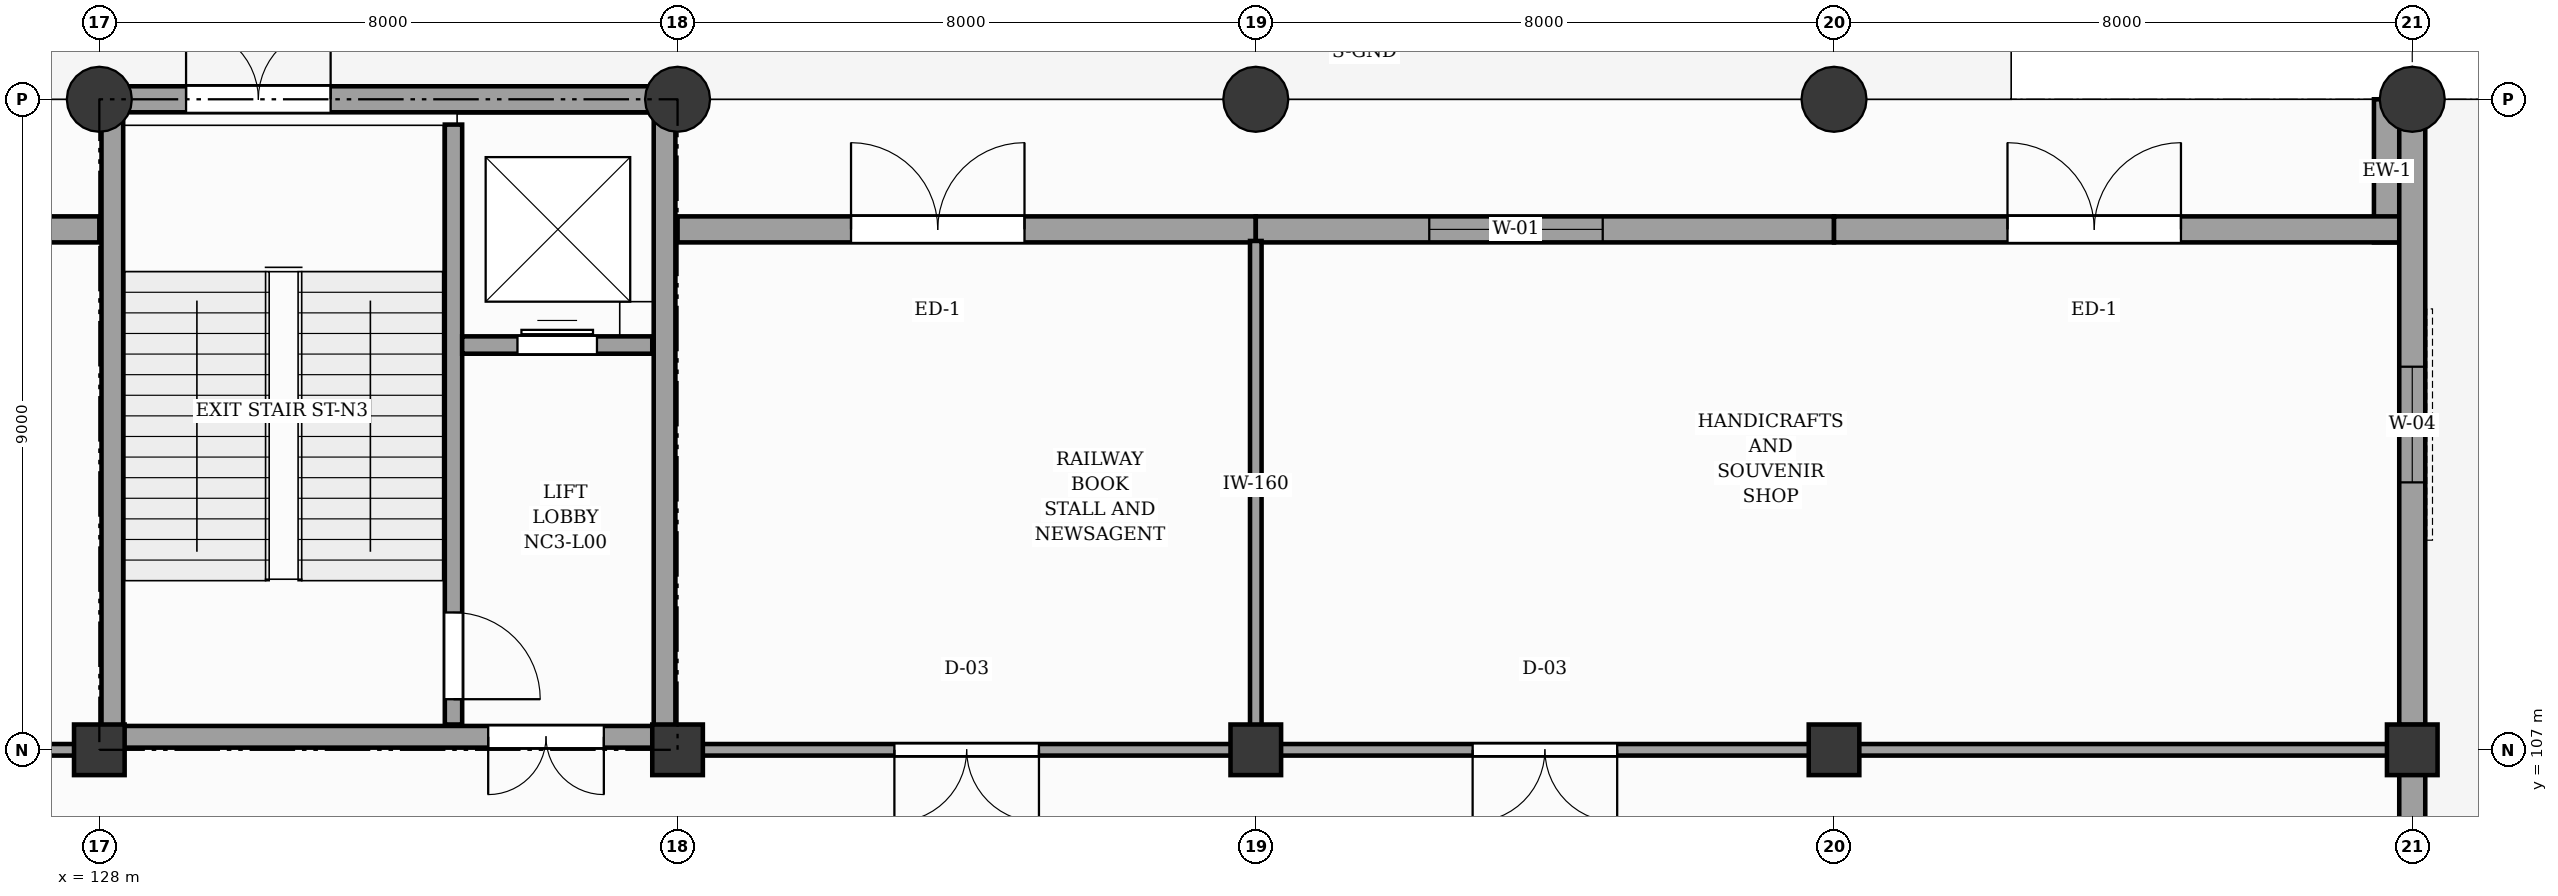
"""IFC4 building model, lengths in metres.
Left out: names, types, materials, properties, quantities, classifications, styles, units other than length and angle.
Written with IfcOpenShell. Run it as: python <this file> out.ifc"""

import sys

from ifc_helpers import new_model, si_unit, direction, frame, frame_2d, origin, origin_2d, place, context, subcontext, project, spatial, rectangle, circle, extrude, element, fill, save


model = new_model("IFC4")
c1 = context("Model", 3, precision=1e-05, world=origin(), true_north=direction((0.0, 1.0)))
c2 = subcontext(c1, "Body", "Model", "MODEL_VIEW")
j1 = project(units=[si_unit("LENGTHUNIT", "METRE"), si_unit("PLANEANGLEUNIT", "RADIAN")], contexts=[c1])
p1 = place(None, origin())
s1 = spatial("IfcSite", under=j1, at=p1, CompositionType="ELEMENT")
p2 = place(p1, origin())
s2 = spatial("IfcBuilding", under=s1, at=p2, CompositionType="ELEMENT")
p3 = place(p2, origin())
s3 = spatial("IfcBuildingStorey", under=s2, at=p3, CompositionType="ELEMENT", Elevation=0.0)
p4 = place(p3, frame((128.0, 107.0, -0.3), z_axis=(0.0, 0.0, 1.0), x_axis=(1.0, 0.0, 0.0)))
e1 = element("IfcColumn", 1, at=p4, inside=s3, PredefinedType="COLUMN", context=c2, shape_type="SweptSolid", body=[
    extrude(rectangle(XDim=0.7, YDim=0.7, at=origin_2d()), origin(), (0.0, 0.0, 1.0), 5.1),
])
p5 = place(p3, frame((128.0, 116.0, -0.3), z_axis=(0.0, 0.0, 1.0), x_axis=(1.0, 0.0, 0.0)))
e2 = element("IfcColumn", 2, at=p5, inside=s3, PredefinedType="PILASTER", context=c2, shape_type="SweptSolid", body=[
    extrude(circle(Radius=0.45, at=origin_2d()), origin(), (0.0, 0.0, 1.0), 5.1),
])
p6 = place(p3, frame((136.0, 107.0, -0.3), z_axis=(0.0, 0.0, 1.0), x_axis=(1.0, 0.0, 0.0)))
e3 = element("IfcColumn", 3, at=p6, inside=s3, PredefinedType="COLUMN", context=c2, shape_type="SweptSolid", body=[
    extrude(rectangle(XDim=0.7, YDim=0.7, at=origin_2d()), origin(), (0.0, 0.0, 1.0), 5.1),
])
p7 = place(p3, frame((136.0, 116.0, -0.3), z_axis=(0.0, 0.0, 1.0), x_axis=(1.0, 0.0, 0.0)))
e4 = element("IfcColumn", 4, at=p7, inside=s3, PredefinedType="PILASTER", context=c2, shape_type="SweptSolid", body=[
    extrude(circle(Radius=0.45, at=origin_2d()), origin(), (0.0, 0.0, 1.0), 5.1),
])
p8 = place(p3, frame((144.0, 107.0, -0.3), z_axis=(0.0, 0.0, 1.0), x_axis=(1.0, 0.0, 0.0)))
e5 = element("IfcColumn", 5, at=p8, inside=s3, PredefinedType="COLUMN", context=c2, shape_type="SweptSolid", body=[
    extrude(rectangle(XDim=0.7, YDim=0.7, at=origin_2d()), origin(), (0.0, 0.0, 1.0), 5.1),
])
p9 = place(p3, frame((144.0, 116.0, -0.3), z_axis=(0.0, 0.0, 1.0), x_axis=(1.0, 0.0, 0.0)))
e6 = element("IfcColumn", 6, at=p9, inside=s3, PredefinedType="PILASTER", context=c2, shape_type="SweptSolid", body=[
    extrude(circle(Radius=0.45, at=origin_2d()), origin(), (0.0, 0.0, 1.0), 5.1),
])
p10 = place(p3, frame((152.0, 107.0, -0.3), z_axis=(0.0, 0.0, 1.0), x_axis=(1.0, 0.0, 0.0)))
e7 = element("IfcColumn", 7, at=p10, inside=s3, PredefinedType="COLUMN", context=c2, shape_type="SweptSolid", body=[
    extrude(rectangle(XDim=0.7, YDim=0.7, at=origin_2d()), origin(), (0.0, 0.0, 1.0), 5.1),
])
p11 = place(p3, frame((152.0, 116.0, -0.3), z_axis=(0.0, 0.0, 1.0), x_axis=(1.0, 0.0, 0.0)))
e8 = element("IfcColumn", 8, at=p11, inside=s3, PredefinedType="PILASTER", context=c2, shape_type="SweptSolid", body=[
    extrude(circle(Radius=0.45, at=origin_2d()), origin(), (0.0, 0.0, 1.0), 5.1),
])
p12 = place(p3, frame((160.0, 107.0, -0.3), z_axis=(0.0, 0.0, 1.0), x_axis=(1.0, 0.0, 0.0)))
e9 = element("IfcColumn", 9, at=p12, inside=s3, PredefinedType="COLUMN", context=c2, shape_type="SweptSolid", body=[
    extrude(rectangle(XDim=0.7, YDim=0.7, at=origin_2d()), origin(), (0.0, 0.0, 1.0), 5.1),
])
p13 = place(p3, frame((160.0, 116.0, -0.3), z_axis=(0.0, 0.0, 1.0), x_axis=(1.0, 0.0, 0.0)))
e10 = element("IfcColumn", 10, at=p13, inside=s3, PredefinedType="PILASTER", context=c2, shape_type="SweptSolid", body=[
    extrude(circle(Radius=0.45, at=origin_2d()), origin(), (0.0, 0.0, 1.0), 5.1),
])
p14 = place(p3, frame((120.0, 114.2, 0.0), z_axis=(0.0, 0.0, 1.0), x_axis=(1.0, 0.0, 0.0)))
e11 = element("IfcWall", 11, at=p14, inside=s3, PredefinedType="SOLIDWALL", context=c2, shape_type="SweptSolid", body=[
    extrude(rectangle(XDim=8.0, YDim=0.36, at=frame_2d((4.0, 0.0))), origin(), (0.0, 0.0, 1.0), 3.84),
])
p15 = place(p14, frame((2.4, 0.0, 0.0)))
e12 = element("IfcOpeningElement", 12, at=p15, cuts=e11, PredefinedType="OPENING", context=c2, shape_type="SweptSolid", body=[
    extrude(rectangle(XDim=2.4, YDim=2.35, at=frame_2d((1.2, 1.175))), frame((0.0, 0.19, 0.0), z_axis=(0.0, -1.0, 0.0), x_axis=(1.0, 0.0, 0.0)), (0.0, 0.0, 1.0), 0.38),
])
p16 = place(p3, frame((128.4, 116.0, 0.0), z_axis=(0.0, 0.0, 1.0), x_axis=(1.0, 0.0, 0.0)))
e13 = element("IfcWall", 13, at=p16, inside=s3, PredefinedType="SOLIDWALL", context=c2, shape_type="SweptSolid", body=[
    extrude(rectangle(XDim=7.2, YDim=0.36, at=frame_2d((3.6, 0.0))), origin(), (0.0, 0.0, 1.0), 3.84),
])
p17 = place(p16, frame((0.8, 0.0, 0.0)))
e14 = element("IfcOpeningElement", 14, at=p17, cuts=e13, PredefinedType="OPENING", context=c2, shape_type="SweptSolid", body=[
    extrude(rectangle(XDim=2.0, YDim=2.2, at=frame_2d((1.0, 1.1))), frame((0.0, 0.19, 0.0), z_axis=(0.0, -1.0, 0.0), x_axis=(1.0, 0.0, 0.0)), (0.0, 0.0, 1.0), 0.38),
])
p18 = place(p3, frame((136.0, 114.2, 0.0), z_axis=(0.0, 0.0, 1.0), x_axis=(1.0, 0.0, 0.0)))
e15 = element("IfcWall", 15, at=p18, inside=s3, PredefinedType="SOLIDWALL", context=c2, shape_type="SweptSolid", body=[
    extrude(rectangle(XDim=8.0, YDim=0.36, at=frame_2d((4.0, 0.0))), origin(), (0.0, 0.0, 1.0), 3.84),
])
p19 = place(p18, frame((2.4, 0.0, 0.0)))
e16 = element("IfcOpeningElement", 16, at=p19, cuts=e15, PredefinedType="OPENING", context=c2, shape_type="SweptSolid", body=[
    extrude(rectangle(XDim=2.4, YDim=2.35, at=frame_2d((1.2, 1.175))), frame((0.0, 0.19, 0.0), z_axis=(0.0, -1.0, 0.0), x_axis=(1.0, 0.0, 0.0)), (0.0, 0.0, 1.0), 0.38),
])
p20 = place(p3, frame((144.0, 114.2, 0.0), z_axis=(0.0, 0.0, 1.0), x_axis=(1.0, 0.0, 0.0)))
e17 = element("IfcWall", 17, at=p20, inside=s3, PredefinedType="SOLIDWALL", context=c2, shape_type="SweptSolid", body=[
    extrude(rectangle(XDim=8.0, YDim=0.36, at=frame_2d((4.0, 0.0))), origin(), (0.0, 0.0, 1.0), 3.84),
])
p21 = place(p20, frame((2.4, 0.0, 0.9)))
e18 = element("IfcOpeningElement", 18, at=p21, cuts=e17, PredefinedType="OPENING", context=c2, shape_type="SweptSolid", body=[
    extrude(rectangle(XDim=2.4, YDim=2.6, at=frame_2d((1.2, 1.3))), frame((0.0, 0.19, 0.0), z_axis=(0.0, -1.0, 0.0), x_axis=(1.0, 0.0, 0.0)), (0.0, 0.0, 1.0), 0.38),
])
p22 = place(p3, frame((159.65, 114.02, 0.0), z_axis=(0.0, 0.0, 1.0), x_axis=(0.0, 1.0, 0.0)))
e19 = element("IfcWall", 19, at=p22, inside=s3, PredefinedType="SOLIDWALL", context=c2, shape_type="SweptSolid", body=[
    extrude(rectangle(XDim=1.98, YDim=0.36, at=frame_2d((0.99, 0.0))), origin(), (0.0, 0.0, 1.0), 3.84),
])
p23 = place(p3, frame((152.0, 114.2, 0.0), z_axis=(0.0, 0.0, 1.0), x_axis=(1.0, 0.0, 0.0)))
e20 = element("IfcWall", 20, at=p23, inside=s3, PredefinedType="SOLIDWALL", context=c2, shape_type="SweptSolid", body=[
    extrude(rectangle(XDim=8.0, YDim=0.36, at=frame_2d((4.0, 0.0))), origin(), (0.0, 0.0, 1.0), 3.84),
])
p24 = place(p23, frame((2.4, 0.0, 0.0)))
e21 = element("IfcOpeningElement", 21, at=p24, cuts=e20, PredefinedType="OPENING", context=c2, shape_type="SweptSolid", body=[
    extrude(rectangle(XDim=2.4, YDim=2.35, at=frame_2d((1.2, 1.175))), frame((0.0, 0.19, 0.0), z_axis=(0.0, -1.0, 0.0), x_axis=(1.0, 0.0, 0.0)), (0.0, 0.0, 1.0), 0.38),
])
p25 = place(p3, frame((160.0, 98.345, 0.0), z_axis=(0.0, 0.0, 1.0), x_axis=(0.0, 1.0, 0.0)))
e22 = element("IfcWall", 22, at=p25, inside=s3, PredefinedType="SOLIDWALL", context=c2, shape_type="SweptSolid", body=[
    extrude(rectangle(XDim=8.31, YDim=0.36, at=frame_2d((4.155, 0.0))), origin(), (0.0, 0.0, 1.0), 3.71),
])
p26 = place(p25, frame((2.955, 0.0, 0.0)))
e23 = element("IfcOpeningElement", 23, at=p26, cuts=e22, PredefinedType="OPENING", context=c2, shape_type="SweptSolid", body=[
    extrude(rectangle(XDim=2.4, YDim=2.35, at=frame_2d((1.2, 1.175))), frame((0.0, 0.19, 0.0), z_axis=(0.0, -1.0, 0.0), x_axis=(1.0, 0.0, 0.0)), (0.0, 0.0, 1.0), 0.38),
])
p27 = place(p3, frame((160.0, 107.345, 0.0), z_axis=(0.0, 0.0, 1.0), x_axis=(0.0, 1.0, 0.0)))
e24 = element("IfcWall", 24, at=p27, inside=s3, PredefinedType="SOLIDWALL", context=c2, shape_type="SweptSolid", body=[
    extrude(rectangle(XDim=8.255, YDim=0.36, at=frame_2d((4.127, 0.0))), origin(), (0.0, 0.0, 1.0), 3.76),
])
p28 = place(p27, frame((3.355, 0.0, 0.95)))
e25 = element("IfcOpeningElement", 25, at=p28, cuts=e24, PredefinedType="OPENING", context=c2, shape_type="SweptSolid", body=[
    extrude(rectangle(XDim=1.6, YDim=2.1, at=frame_2d((0.8, 1.05))), frame((0.0, 0.19, 0.0), z_axis=(0.0, -1.0, 0.0), x_axis=(1.0, 0.0, 0.0)), (0.0, 0.0, 1.0), 0.38),
])
p29 = place(p3, frame((132.9, 107.35, 0.0), z_axis=(0.0, 0.0, 1.0), x_axis=(0.0, 1.0, 0.0)))
e26 = element("IfcWall", 26, at=p29, inside=s3, PredefinedType="SHEAR", context=c2, shape_type="SweptSolid", body=[
    extrude(rectangle(XDim=8.3, YDim=0.24, at=frame_2d((4.15, 0.0))), origin(), (0.0, 0.0, 1.0), 4.52),
])
p30 = place(p29, frame((0.35, 0.0, 0.0)))
e27 = element("IfcOpeningElement", 27, at=p30, cuts=e26, PredefinedType="OPENING", context=c2, shape_type="SweptSolid", body=[
    extrude(rectangle(XDim=1.2, YDim=2.15, at=frame_2d((0.6, 1.075))), frame((0.0, 0.13, 0.0), z_axis=(0.0, -1.0, 0.0), x_axis=(1.0, 0.0, 0.0)), (0.0, 0.0, 1.0), 0.26),
])
p31 = place(p3, frame((133.02, 112.6, 0.0), z_axis=(0.0, 0.0, 1.0), x_axis=(1.0, 0.0, 0.0)))
e28 = element("IfcWall", 28, at=p31, inside=s3, PredefinedType="SHEAR", context=c2, shape_type="SweptSolid", body=[
    extrude(rectangle(XDim=2.63, YDim=0.24, at=frame_2d((1.315, 0.0))), origin(), (0.0, 0.0, 1.0), 4.52),
])
p32 = place(p31, frame((0.765, 0.0, 0.0)))
e29 = element("IfcOpeningElement", 29, at=p32, cuts=e28, PredefinedType="OPENING", context=c2, shape_type="SweptSolid", body=[
    extrude(rectangle(XDim=1.1, YDim=2.15, at=frame_2d((0.55, 1.075))), frame((0.0, 0.13, 0.0), z_axis=(0.0, -1.0, 0.0), x_axis=(1.0, 0.0, 0.0)), (0.0, 0.0, 1.0), 0.26),
])
for number, where, z_axis, x_axis in (
    (30, (128.18, 107.18, 0.0), (0.0, 0.0, 1.0), (0.0, 1.0, 0.0)),
    (31, (135.82, 107.18, 0.0), (0.0, 0.0, 1.0), (0.0, 1.0, 0.0)),
):
    element("IfcWall", number, at=place(p3, frame(where, z_axis=z_axis, x_axis=x_axis)), inside=s3, PredefinedType="SHEAR", context=c2, shape_type="SweptSolid", body=[
        extrude(rectangle(XDim=8.64, YDim=0.3, at=frame_2d((4.32, 0.0))), origin(), (0.0, 0.0, 1.0), 4.52),
    ])
p33 = place(p3, frame((128.03, 107.18, 0.0), z_axis=(0.0, 0.0, 1.0), x_axis=(1.0, 0.0, 0.0)))
e32 = element("IfcWall", 32, at=p33, inside=s3, PredefinedType="SHEAR", context=c2, shape_type="SweptSolid", body=[
    extrude(rectangle(XDim=7.94, YDim=0.3, at=frame_2d((3.97, 0.0))), origin(), (0.0, 0.0, 1.0), 4.52),
])
p34 = place(p33, frame((5.35, 0.0, 0.0)))
e33 = element("IfcOpeningElement", 33, at=p34, cuts=e32, PredefinedType="OPENING", context=c2, shape_type="SweptSolid", body=[
    extrude(rectangle(XDim=1.6, YDim=2.15, at=frame_2d((0.8, 1.075))), frame((0.0, 0.16, 0.0), z_axis=(0.0, -1.0, 0.0), x_axis=(1.0, 0.0, 0.0)), (0.0, 0.0, 1.0), 0.32),
])
p35 = place(p3, frame((120.3, 107.0, 0.0), z_axis=(0.0, 0.0, 1.0), x_axis=(1.0, 0.0, 0.0)))
e34 = element("IfcWall", 34, at=p35, inside=s3, PredefinedType="PARTITIONING", context=c2, shape_type="SweptSolid", body=[
    extrude(rectangle(XDim=7.4, YDim=0.16, at=frame_2d((3.7, 0.0))), origin(), (0.0, 0.0, 1.0), 2.93),
])
p36 = place(p35, frame((2.7, 0.0, 0.0)))
e35 = element("IfcOpeningElement", 35, at=p36, cuts=e34, PredefinedType="OPENING", context=c2, shape_type="SweptSolid", body=[
    extrude(rectangle(XDim=2.0, YDim=2.3, at=frame_2d((1.0, 1.15))), frame((0.0, 0.09, 0.0), z_axis=(0.0, -1.0, 0.0), x_axis=(1.0, 0.0, 0.0)), (0.0, 0.0, 1.0), 0.18),
])
p37 = place(p3, frame((136.3, 107.0, 0.0), z_axis=(0.0, 0.0, 1.0), x_axis=(1.0, 0.0, 0.0)))
e36 = element("IfcWall", 36, at=p37, inside=s3, PredefinedType="PARTITIONING", context=c2, shape_type="SweptSolid", body=[
    extrude(rectangle(XDim=7.4, YDim=0.16, at=frame_2d((3.7, 0.0))), origin(), (0.0, 0.0, 1.0), 3.7),
])
p38 = place(p37, frame((2.7, 0.0, 0.0)))
e37 = element("IfcOpeningElement", 37, at=p38, cuts=e36, PredefinedType="OPENING", context=c2, shape_type="SweptSolid", body=[
    extrude(rectangle(XDim=2.0, YDim=2.3, at=frame_2d((1.0, 1.15))), frame((0.0, 0.09, 0.0), z_axis=(0.0, -1.0, 0.0), x_axis=(1.0, 0.0, 0.0)), (0.0, 0.0, 1.0), 0.18),
])
p39 = place(p3, frame((144.0, 107.3, 0.0), z_axis=(0.0, 0.0, 1.0), x_axis=(0.0, 1.0, 0.0)))
e38 = element("IfcWall", 38, at=p39, inside=s3, PredefinedType="PARTITIONING", context=c2, shape_type="SweptSolid", body=[
    extrude(rectangle(XDim=6.74, YDim=0.16, at=frame_2d((3.37, 0.0))), origin(), (0.0, 0.0, 1.0), 3.7),
])
p40 = place(p3, frame((144.3, 107.0, 0.0), z_axis=(0.0, 0.0, 1.0), x_axis=(1.0, 0.0, 0.0)))
e39 = element("IfcWall", 39, at=p40, inside=s3, PredefinedType="PARTITIONING", context=c2, shape_type="SweptSolid", body=[
    extrude(rectangle(XDim=7.4, YDim=0.16, at=frame_2d((3.7, 0.0))), origin(), (0.0, 0.0, 1.0), 3.7),
])
p41 = place(p40, frame((2.7, 0.0, 0.0)))
e40 = element("IfcOpeningElement", 40, at=p41, cuts=e39, PredefinedType="OPENING", context=c2, shape_type="SweptSolid", body=[
    extrude(rectangle(XDim=2.0, YDim=2.3, at=frame_2d((1.0, 1.15))), frame((0.0, 0.09, 0.0), z_axis=(0.0, -1.0, 0.0), x_axis=(1.0, 0.0, 0.0)), (0.0, 0.0, 1.0), 0.18),
])
p42 = place(p3, frame((152.3, 107.0, 0.0), z_axis=(0.0, 0.0, 1.0), x_axis=(1.0, 0.0, 0.0)))
e41 = element("IfcWall", 41, at=p42, inside=s3, PredefinedType="PARTITIONING", context=c2, shape_type="SweptSolid", body=[
    extrude(rectangle(XDim=7.4, YDim=0.16, at=frame_2d((3.7, 0.0))), origin(), (0.0, 0.0, 1.0), 3.7),
])
p43 = place(p17, origin())
e42 = element("IfcDoor", 42, at=p43, inside=s3, OperationType="DOUBLE_DOOR_SINGLE_SWING", PredefinedType="DOOR", context=c2, shape_type="SweptSolid", body=[
    extrude(rectangle(XDim=2.0, YDim=2.2, at=frame_2d((1.0, 1.1))), frame((0.0, 0.025, 0.0), z_axis=(0.0, -1.0, 0.0), x_axis=(1.0, 0.0, 0.0)), (0.0, 0.0, 1.0), 0.05),
])
fill(e14, e42)
p44 = place(p19, origin())
e43 = element("IfcDoor", 43, at=p44, inside=s3, OperationType="DOUBLE_DOOR_SINGLE_SWING", PredefinedType="DOOR", context=c2, shape_type="SweptSolid", body=[
    extrude(rectangle(XDim=2.4, YDim=2.35, at=frame_2d((1.2, 1.175))), frame((0.0, 0.025, 0.0), z_axis=(0.0, -1.0, 0.0), x_axis=(1.0, 0.0, 0.0)), (0.0, 0.0, 1.0), 0.05),
])
fill(e16, e43)
p45 = place(p21, origin())
e44 = element("IfcWindow", 44, at=p45, inside=s3, PartitioningType="SINGLE_PANEL", PredefinedType="WINDOW", context=c2, shape_type="SweptSolid", body=[
    extrude(rectangle(XDim=2.4, YDim=2.6, at=frame_2d((1.2, 1.3))), frame((0.0, 0.03, 0.0), z_axis=(0.0, -1.0, 0.0), x_axis=(1.0, 0.0, 0.0)), (0.0, 0.0, 1.0), 0.06),
])
fill(e18, e44)
p46 = place(p24, origin())
e45 = element("IfcDoor", 45, at=p46, inside=s3, OperationType="DOUBLE_DOOR_SINGLE_SWING", PredefinedType="DOOR", context=c2, shape_type="SweptSolid", body=[
    extrude(rectangle(XDim=2.4, YDim=2.35, at=frame_2d((1.2, 1.175))), frame((0.0, 0.025, 0.0), z_axis=(0.0, -1.0, 0.0), x_axis=(1.0, 0.0, 0.0)), (0.0, 0.0, 1.0), 0.05),
])
fill(e21, e45)
p47 = place(p28, origin())
e46 = element("IfcWindow", 46, at=p47, inside=s3, PartitioningType="SINGLE_PANEL", PredefinedType="WINDOW", context=c2, shape_type="SweptSolid", body=[
    extrude(rectangle(XDim=1.6, YDim=2.1, at=frame_2d((0.8, 1.05))), frame((0.0, 0.03, 0.0), z_axis=(0.0, -1.0, 0.0), x_axis=(1.0, 0.0, 0.0)), (0.0, 0.0, 1.0), 0.06),
])
fill(e25, e46)
p48 = place(p30, frame((1.2, 0.0, 0.0), z_axis=(0.0, 0.0, 1.0), x_axis=(-1.0, 0.0, 0.0)))
e47 = element("IfcDoor", 47, at=p48, inside=s3, OperationType="SINGLE_SWING_LEFT", PredefinedType="DOOR", context=c2, shape_type="SweptSolid", body=[
    extrude(rectangle(XDim=1.2, YDim=2.15, at=frame_2d((0.6, 1.075))), frame((0.0, 0.025, 0.0), z_axis=(0.0, -1.0, 0.0), x_axis=(1.0, 0.0, 0.0)), (0.0, 0.0, 1.0), 0.05),
])
fill(e27, e47)
p49 = place(p32, origin())
e48 = element("IfcDoor", 48, at=p49, inside=s3, OperationType="DOUBLE_DOOR_SLIDING", PredefinedType="DOOR", context=c2, shape_type="SweptSolid", body=[
    extrude(rectangle(XDim=1.1, YDim=2.15, at=frame_2d((0.55, 1.075))), frame((0.0, 0.025, 0.0), z_axis=(0.0, -1.0, 0.0), x_axis=(1.0, 0.0, 0.0)), (0.0, 0.0, 1.0), 0.05),
])
fill(e29, e48)
p50 = place(p34, frame((1.6, 0.0, 0.0), z_axis=(0.0, 0.0, 1.0), x_axis=(-1.0, 0.0, 0.0)))
e49 = element("IfcDoor", 49, at=p50, inside=s3, OperationType="DOUBLE_DOOR_SINGLE_SWING", PredefinedType="DOOR", context=c2, shape_type="SweptSolid", body=[
    extrude(rectangle(XDim=1.6, YDim=2.15, at=frame_2d((0.8, 1.075))), frame((0.0, 0.025, 0.0), z_axis=(0.0, -1.0, 0.0), x_axis=(1.0, 0.0, 0.0)), (0.0, 0.0, 1.0), 0.05),
])
fill(e33, e49)
p51 = place(p38, frame((2.0, 0.0, 0.0), z_axis=(0.0, 0.0, 1.0), x_axis=(-1.0, 0.0, 0.0)))
e50 = element("IfcDoor", 50, at=p51, inside=s3, OperationType="DOUBLE_DOOR_SINGLE_SWING", PredefinedType="DOOR", context=c2, shape_type="SweptSolid", body=[
    extrude(rectangle(XDim=2.0, YDim=2.3, at=frame_2d((1.0, 1.15))), frame((0.0, 0.025, 0.0), z_axis=(0.0, -1.0, 0.0), x_axis=(1.0, 0.0, 0.0)), (0.0, 0.0, 1.0), 0.05),
])
fill(e37, e50)
p52 = place(p41, frame((2.0, 0.0, 0.0), z_axis=(0.0, 0.0, 1.0), x_axis=(-1.0, 0.0, 0.0)))
e51 = element("IfcDoor", 51, at=p52, inside=s3, OperationType="DOUBLE_DOOR_SINGLE_SWING", PredefinedType="DOOR", context=c2, shape_type="SweptSolid", body=[
    extrude(rectangle(XDim=2.0, YDim=2.3, at=frame_2d((1.0, 1.15))), frame((0.0, 0.025, 0.0), z_axis=(0.0, -1.0, 0.0), x_axis=(1.0, 0.0, 0.0)), (0.0, 0.0, 1.0), 0.05),
])
fill(e40, e51)
save(model, sys.argv[1])
